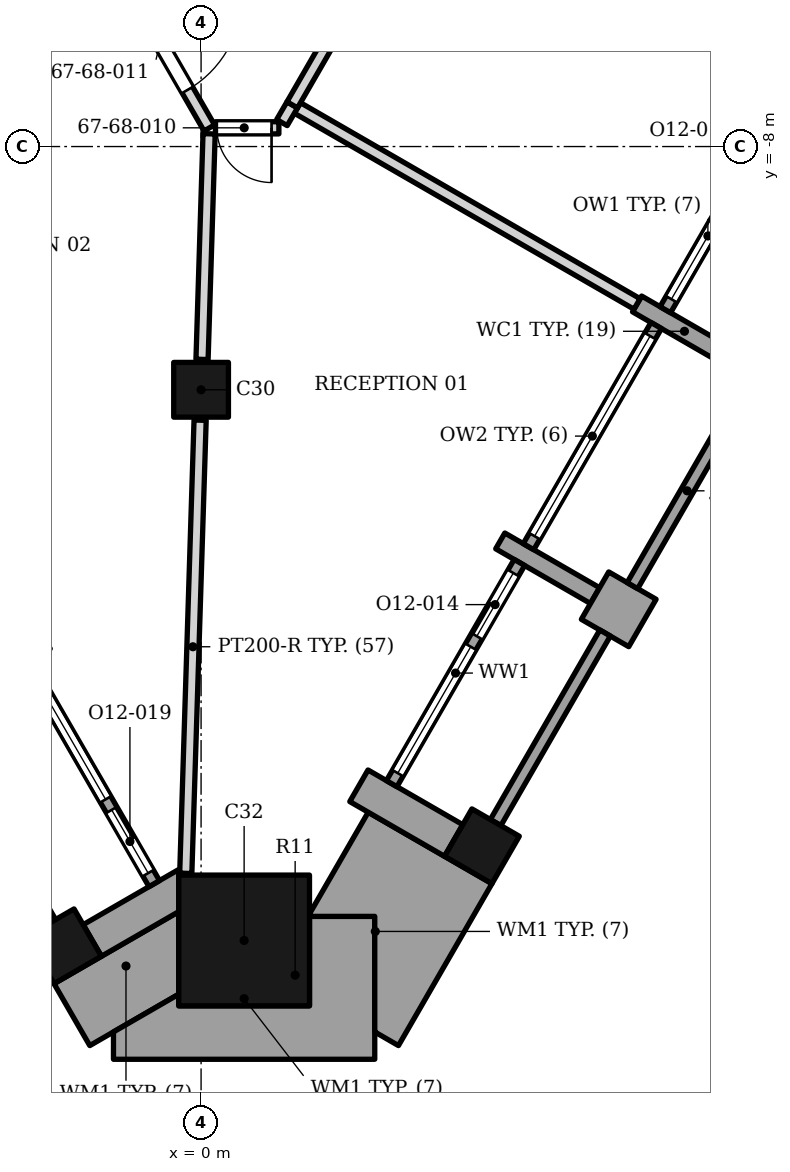
"""IFC4 building model, lengths in metres.
Left out: names, types, materials, properties, quantities, classifications, styles, units other than length and angle.
Written with IfcOpenShell. Run it as: python <this file> out.ifc"""

import sys

from ifc_helpers import new_model, si_unit, direction, frame, frame_2d, origin, origin_2d, place, context, subcontext, project, spatial, polyline, rectangle, outline, extrude, element, fill, save


model = new_model("IFC4")
c1 = context("Model", 3, precision=1e-05, world=origin(), true_north=direction((0.0, 1.0)))
c2 = subcontext(c1, "Body", "Model", "MODEL_VIEW")
j1 = project(units=[si_unit("LENGTHUNIT", "METRE"), si_unit("PLANEANGLEUNIT", "RADIAN")], contexts=[c1])
p1 = place(None, origin())
s1 = spatial("IfcSite", under=j1, at=p1, CompositionType="ELEMENT")
p2 = place(p1, origin())
s2 = spatial("IfcBuilding", under=s1, at=p2, CompositionType="ELEMENT")
p3 = place(p2, frame((0.0, 0.0, 279.4)))
s3 = spatial("IfcBuildingStorey", under=s2, at=p3, CompositionType="ELEMENT", Elevation=279.4)
p4 = place(p3, frame((0.708, -21.056, 0.0), z_axis=(0.0, 0.0, 1.0), x_axis=(0.0, 1.0, 0.0)))
e1 = element("IfcColumn", 1, at=p4, inside=s3, PredefinedType="COLUMN", context=c2, shape_type="SweptSolid", body=[
    extrude(rectangle(XDim=2.15, YDim=2.15, at=origin_2d()), origin(), (0.0, 0.0, 1.0), 3.9),
])
for number, where, z_axis, x_axis in (
    (2, (0.0, -12.0, 0.0), (0.0, 0.0, 1.0), (1.0, 0.0, 0.0)),
    (3, (-2.254, -21.152, 0.0), (0.0, 0.0, 1.0), (0.5, -0.866, 0.0)),
    (4, (4.619, -19.507, 0.0), (0.0, 0.0, 1.0), (0.5, 0.866, 0.0)),
):
    element("IfcColumn", number, at=place(p3, frame(where, z_axis=z_axis, x_axis=x_axis)), inside=s3, PredefinedType="COLUMN", context=c2, shape_type="SweptSolid", body=[
        extrude(rectangle(XDim=0.9, YDim=0.9, at=origin_2d()), origin(), (0.0, 0.0, 1.0), 3.9),
    ])
p5 = place(p3, origin())
e5 = element("IfcWall", 5, at=p5, inside=s3, PredefinedType="SOLIDWALL", context=c2, shape_type="SweptSolid", body=[
    extrude(outline(polyline([(-1.639, -21.316), (-0.367, -20.582), (-0.367, -19.981), (-0.332, -19.981), (-0.381, -19.897), (-1.939, -20.797), (-1.639, -21.316)])), origin(), (0.0, 0.0, 1.0), 3.0),
])
p6 = place(p3, frame((-4.279, -17.644, 0.0), z_axis=(0.0, 0.0, 1.0), x_axis=(0.500012057535, -0.866018442252, 0.0)))
e6 = element("IfcWall", 6, at=p6, inside=s3, PredefinedType="SOLIDWALL", context=c2, shape_type="SweptSolid", body=[
    extrude(rectangle(XDim=3.6, YDim=0.2, at=frame_2d((1.8, 0.0))), origin(), (0.0, 0.0, 1.0), 3.0),
])
p7 = place(p3, frame((-2.87, -16.484, 0.0), z_axis=(0.0, 0.0, 1.0), x_axis=(0.49998411664, -0.866034573852, 0.0)))
e7 = element("IfcWall", 7, at=p7, inside=s3, PredefinedType="ELEMENTEDWALL", context=c2, shape_type="SweptSolid", body=[
    extrude(rectangle(XDim=4.2, YDim=0.2, at=frame_2d((2.1, 0.0))), origin(), (0.0, 0.0, 1.0), 3.0),
])
p8 = place(p7, frame((0.2, 0.0, 0.45)))
e8 = element("IfcOpeningElement", 8, at=p8, cuts=e7, PredefinedType="OPENING", context=c2, shape_type="SweptSolid", body=[
    extrude(rectangle(XDim=2.4, YDim=2.25, at=frame_2d((1.2, 1.125))), frame((0.0, 0.11, 0.0), z_axis=(0.0, -1.0, 0.0), x_axis=(1.0, 0.0, 0.0)), (0.0, 0.0, 1.0), 0.22),
])
p9 = place(p7, frame((2.8, 0.0, 0.0)))
e9 = element("IfcOpeningElement", 9, at=p9, cuts=e7, PredefinedType="OPENING", context=c2, shape_type="SweptSolid", body=[
    extrude(rectangle(XDim=1.2, YDim=2.7, at=frame_2d((0.6, 1.35))), frame((0.0, 0.11, 0.0), z_axis=(0.0, -1.0, 0.0), x_axis=(1.0, 0.0, 0.0)), (0.0, 0.0, 1.0), 0.22),
])
p10 = place(p3, frame((4.154, -19.412, 0.0), z_axis=(0.0, 0.0, 1.0), x_axis=(-0.866047807691, 0.499961193289, 0.0)))
e10 = element("IfcWall", 10, at=p10, inside=s3, PredefinedType="SOLIDWALL", context=c2, shape_type="SweptSolid", body=[
    extrude(rectangle(XDim=1.8, YDim=0.6, at=frame_2d((0.9, 0.0))), origin(), (0.0, 0.0, 1.0), 3.0),
])
p11 = place(p3, frame((6.479, -15.385, 0.0), z_axis=(0.0, 0.0, 1.0), x_axis=(0.866013897511, -0.50001992892, 0.0)))
e11 = element("IfcWall", 11, at=p11, inside=s3, PredefinedType="SOLIDWALL", context=c2, shape_type="SweptSolid", body=[
    extrude(rectangle(XDim=0.9, YDim=0.9, at=frame_2d((0.45, 0.0))), origin(), (0.0, 0.0, 1.0), 3.0),
])
for number, where, z_axis, x_axis in (
    (12, (6.479, -15.385, 0.0), (0.0, 0.0, 1.0), (-0.866, 0.5, 0.0)),
    (13, (8.729, -11.488, 0.0), (0.0, 0.0, 1.0), (-0.866, 0.5, 0.0)),
):
    element("IfcWall", number, at=place(p3, frame(where, z_axis=z_axis, x_axis=x_axis)), inside=s3, PredefinedType="SOLIDWALL", context=c2, shape_type="SweptSolid", body=[
        extrude(rectangle(XDim=1.8, YDim=0.3, at=frame_2d((0.9, 0.0))), origin(), (0.0, 0.0, 1.0), 3.0),
    ])
p12 = place(p3, frame((4.844, -19.118, 0.0), z_axis=(0.0, 0.0, 1.0), x_axis=(0.500012057535, 0.866018442252, 0.0)))
e14 = element("IfcWall", 14, at=p12, inside=s3, PredefinedType="SOLIDWALL", context=c2, shape_type="SweptSolid", body=[
    extrude(rectangle(XDim=3.6, YDim=0.2, at=frame_2d((1.8, 0.0))), origin(), (0.0, 0.0, 1.0), 3.0),
])
p13 = place(p3, frame((3.135, -18.477, 0.0), z_axis=(0.0, 0.0, 1.0), x_axis=(0.500027713859, 0.866009402589, 0.0)))
e15 = element("IfcWall", 15, at=p13, inside=s3, PredefinedType="ELEMENTEDWALL", context=c2, shape_type="SweptSolid", body=[
    extrude(rectangle(XDim=4.2, YDim=0.2, at=frame_2d((2.1, 0.0))), origin(), (0.0, 0.0, 1.0), 3.0),
])
p14 = place(p13, frame((0.2, 0.0, 0.45)))
e16 = element("IfcOpeningElement", 16, at=p14, cuts=e15, PredefinedType="OPENING", context=c2, shape_type="SweptSolid", body=[
    extrude(rectangle(XDim=2.4, YDim=2.25, at=frame_2d((1.2, 1.125))), frame((0.0, 0.11, 0.0), z_axis=(0.0, -1.0, 0.0), x_axis=(1.0, 0.0, 0.0)), (0.0, 0.0, 1.0), 0.22),
])
p15 = place(p13, frame((2.8, 0.0, 0.0)))
e17 = element("IfcOpeningElement", 17, at=p15, cuts=e15, PredefinedType="OPENING", context=c2, shape_type="SweptSolid", body=[
    extrude(rectangle(XDim=1.2, YDim=2.7, at=frame_2d((0.6, 1.35))), frame((0.0, 0.11, 0.0), z_axis=(0.0, -1.0, 0.0), x_axis=(1.0, 0.0, 0.0)), (0.0, 0.0, 1.0), 0.22),
])
p16 = place(p3, frame((7.094, -15.22, 0.0), z_axis=(0.0, 0.0, 1.0), x_axis=(0.500012057535, 0.866018442252, 0.0)))
e18 = element("IfcWall", 18, at=p16, inside=s3, PredefinedType="SOLIDWALL", context=c2, shape_type="SweptSolid", body=[
    extrude(rectangle(XDim=3.6, YDim=0.2, at=frame_2d((1.8, 0.0))), origin(), (0.0, 0.0, 1.0), 3.0),
])
p17 = place(p3, frame((5.385, -14.58, 0.0), z_axis=(0.0, 0.0, 1.0), x_axis=(0.500002543286, 0.866023935413, 0.0)))
e19 = element("IfcWall", 19, at=p17, inside=s3, PredefinedType="ELEMENTEDWALL", context=c2, shape_type="SweptSolid", body=[
    extrude(rectangle(XDim=4.2, YDim=0.2, at=frame_2d((2.1, 0.0))), origin(), (0.0, 0.0, 1.0), 2.95),
])
p18 = place(p17, frame((0.2, 0.0, 0.45)))
e20 = element("IfcOpeningElement", 20, at=p18, cuts=e19, PredefinedType="OPENING", context=c2, shape_type="SweptSolid", body=[
    extrude(rectangle(XDim=3.8, YDim=2.25, at=frame_2d((1.9, 1.125))), frame((0.0, 0.11, 0.0), z_axis=(0.0, -1.0, 0.0), x_axis=(1.0, 0.0, 0.0)), (0.0, 0.0, 1.0), 0.22),
])
p19 = place(p3, frame((7.635, -10.683, 0.0), z_axis=(0.0, 0.0, 1.0), x_axis=(0.500027713859, 0.866009402589, 0.0)))
e21 = element("IfcWall", 21, at=p19, inside=s3, PredefinedType="ELEMENTEDWALL", context=c2, shape_type="SweptSolid", body=[
    extrude(rectangle(XDim=4.2, YDim=0.2, at=frame_2d((2.1, 0.0))), origin(), (0.0, 0.0, 1.0), 3.0),
])
p20 = place(p19, frame((0.2, 0.0, 0.45)))
e22 = element("IfcOpeningElement", 22, at=p20, cuts=e21, PredefinedType="OPENING", context=c2, shape_type="SweptSolid", body=[
    extrude(rectangle(XDim=2.4, YDim=2.25, at=frame_2d((1.2, 1.125))), frame((0.0, 0.11, 0.0), z_axis=(0.0, -1.0, 0.0), x_axis=(1.0, 0.0, 0.0)), (0.0, 0.0, 1.0), 0.22),
])
p21 = place(p19, frame((2.8, 0.0, 0.0)))
e23 = element("IfcOpeningElement", 23, at=p21, cuts=e21, PredefinedType="OPENING", context=c2, shape_type="SweptSolid", body=[
    extrude(rectangle(XDim=1.2, YDim=2.7, at=frame_2d((0.6, 1.35))), frame((0.0, 0.11, 0.0), z_axis=(0.0, -1.0, 0.0), x_axis=(1.0, 0.0, 0.0)), (0.0, 0.0, 1.0), 0.22),
])
p22 = place(p3, origin())
e24 = element("IfcWall", 24, at=p22, inside=s3, PredefinedType="SOLIDWALL", context=c2, shape_type="SweptSolid", body=[
    extrude(outline(polyline([(-0.367, -20.62), (-0.384, -20.591), (-1.639, -21.316), (-1.639, -21.317), (-2.418, -21.767), (-1.831, -22.785), (-0.367, -21.94), (-0.367, -20.62)])), origin(), (0.0, 0.0, 1.0), 3.0),
])
p23 = place(p3, origin())
e25 = element("IfcWall", 25, at=p23, inside=s3, PredefinedType="SOLIDWALL", context=c2, shape_type="SweptSolid", body=[
    extrude(outline(polyline([(-0.367, -22.131), (-0.367, -21.94), (-1.441, -22.56), (-1.441, -23.01), (2.856, -23.01), (2.856, -20.66), (1.783, -20.66), (1.783, -22.131), (-0.367, -22.131)])), origin(), (0.0, 0.0, 1.0), 3.0),
])
p24 = place(p3, origin())
e26 = element("IfcWall", 26, at=p24, inside=s3, PredefinedType="SOLIDWALL", context=c2, shape_type="SweptSolid", body=[
    extrude(outline(polyline([(1.783, -20.619), (1.783, -20.66), (2.856, -20.66), (2.856, -22.56), (3.246, -22.785), (4.784, -20.122), (2.749, -18.947), (1.783, -20.619)])), origin(), (0.0, 0.0, 1.0), 3.0),
])
p25 = place(p3, frame((-0.252, -19.952, 0.0), z_axis=(0.0, 0.0, 1.0), x_axis=(0.031599714418, 0.999500604326, 0.0)))
e27 = element("IfcWall", 27, at=p25, inside=s3, PredefinedType="PARTITIONING", context=c2, shape_type="SweptSolid", body=[
    extrude(rectangle(XDim=7.456, YDim=0.2, at=frame_2d((3.728, 0.0))), origin(), (0.0, 0.0, 1.0), 3.332),
])
p26 = place(p3, frame((0.016, -11.5, 0.0), z_axis=(0.0, 0.0, 1.0), x_axis=(0.031312793596, 0.999509634249, 0.0)))
e28 = element("IfcWall", 28, at=p26, inside=s3, PredefinedType="PARTITIONING", context=c2, shape_type="SweptSolid", body=[
    extrude(rectangle(XDim=3.711, YDim=0.2, at=frame_2d((1.855, 0.0))), origin(), (0.0, 0.0, 1.0), 2.884),
])
p27 = place(p3, frame((1.584, -7.365, 0.0), z_axis=(0.0, 0.0, 1.0), x_axis=(0.866145880339, -0.499791270404, 0.0)))
e29 = element("IfcWall", 29, at=p27, inside=s3, PredefinedType="PARTITIONING", context=c2, shape_type="SweptSolid", body=[
    extrude(rectangle(XDim=6.449, YDim=0.2, at=frame_2d((3.225, 0.0))), origin(), (0.0, 0.0, 1.0), 2.884),
])
p28 = place(p3, frame((-5.885, 2.733, 0.0), z_axis=(0.0, 0.0, 1.0), x_axis=(0.499999199346, -0.866025866042, 0.0)))
e30 = element("IfcWall", 30, at=p28, inside=s3, PredefinedType="PARTITIONING", context=c2, shape_type="SweptSolid", body=[
    extrude(rectangle(XDim=12.04, YDim=0.2, at=frame_2d((6.02, 0.0))), origin(), (0.0, 0.0, 1.0), 2.884),
])
p29 = place(p28, frame((4.0, 0.0, 0.0)))
e31 = element("IfcOpeningElement", 31, at=p29, cuts=e30, PredefinedType="OPENING", context=c2, shape_type="SweptSolid", body=[
    extrude(rectangle(XDim=1.0, YDim=2.4, at=frame_2d((0.5, 1.2))), frame((0.0, 0.11, 0.0), z_axis=(0.0, -1.0, 0.0), x_axis=(1.0, 0.0, 0.0)), (0.0, 0.0, 1.0), 0.22),
])
p30 = place(p28, frame((9.52, 0.0, 0.0)))
e32 = element("IfcOpeningElement", 32, at=p30, cuts=e30, PredefinedType="OPENING", context=c2, shape_type="SweptSolid", body=[
    extrude(rectangle(XDim=1.8, YDim=2.4, at=frame_2d((0.9, 1.2))), frame((0.0, 0.11, 0.0), z_axis=(0.0, -1.0, 0.0), x_axis=(1.0, 0.0, 0.0)), (0.0, 0.0, 1.0), 0.22),
])
p31 = place(p3, frame((0.236, -7.692, 0.0), z_axis=(0.0, 0.0, 1.0), x_axis=(1.0, 0.0, 0.0)))
e33 = element("IfcWall", 33, at=p31, inside=s3, PredefinedType="PARTITIONING", context=c2, shape_type="SweptSolid", body=[
    extrude(rectangle(XDim=1.043, YDim=0.2, at=frame_2d((0.522, 0.0))), origin(), (0.0, 0.0, 1.0), 3.73),
])
p32 = place(p31, frame((0.023, 0.0, 0.0)))
e34 = element("IfcOpeningElement", 34, at=p32, cuts=e33, PredefinedType="OPENING", context=c2, shape_type="SweptSolid", body=[
    extrude(rectangle(XDim=0.9, YDim=2.1, at=frame_2d((0.45, 1.05))), frame((0.0, 0.11, 0.0), z_axis=(0.0, -1.0, 0.0), x_axis=(1.0, 0.0, 0.0)), (0.0, 0.0, 1.0), 0.22),
])
p33 = place(p3, frame((1.33, -7.606, 0.0), z_axis=(0.0, 0.0, 1.0), x_axis=(0.503375579216, 0.86406772087, 0.0)))
e35 = element("IfcWall", 35, at=p33, inside=s3, PredefinedType="PARTITIONING", context=c2, shape_type="SweptSolid", body=[
    extrude(rectangle(XDim=0.337, YDim=0.2, at=frame_2d((0.168, 0.0))), origin(), (0.0, 0.0, 1.0), 3.73),
])
p34 = place(p3, frame((-7.055, -8.336, 0.0), z_axis=(0.0, 0.0, 1.0), x_axis=(0.866129493323, 0.499819668277, 0.0)))
e36 = element("IfcWall", 36, at=p34, inside=s3, PredefinedType="PARTITIONING", context=c2, shape_type="SweptSolid", body=[
    extrude(rectangle(XDim=6.45, YDim=0.2, at=frame_2d((3.225, 0.0))), origin(), (0.0, 0.0, 1.0), 2.884),
])
p35 = place(p3, frame((1.5, -7.314, 0.0), z_axis=(0.0, 0.0, 1.0), x_axis=(0.499990139034, 0.866031096941, 0.0)))
e37 = element("IfcWall", 37, at=p35, inside=s3, PredefinedType="PARTITIONING", context=c2, shape_type="SweptSolid", body=[
    extrude(rectangle(XDim=9.0, YDim=0.2, at=frame_2d((4.5, 0.0))), origin(), (0.0, 0.0, 1.0), 2.884),
])
p36 = place(p35, frame((4.0, 0.0, 0.0)))
e38 = element("IfcOpeningElement", 38, at=p36, cuts=e37, PredefinedType="OPENING", context=c2, shape_type="SweptSolid", body=[
    extrude(rectangle(XDim=1.0, YDim=2.1, at=frame_2d((0.5, 1.05))), frame((0.0, 0.11, 0.0), z_axis=(0.0, -1.0, 0.0), x_axis=(1.0, 0.0, 0.0)), (0.0, 0.0, 1.0), 0.22),
])
p37 = place(p8, origin())
e39 = element("IfcWindow", 39, at=p37, inside=s3, PartitioningType="SINGLE_PANEL", PredefinedType="WINDOW", context=c2, shape_type="SweptSolid", body=[
    extrude(rectangle(XDim=2.4, YDim=2.25, at=frame_2d((1.2, 1.125))), frame((0.0, 0.03, 0.0), z_axis=(0.0, -1.0, 0.0), x_axis=(1.0, 0.0, 0.0)), (0.0, 0.0, 1.0), 0.06),
])
fill(e8, e39)
p38 = place(p9, origin())
e40 = element("IfcDoor", 40, at=p38, inside=s3, OperationType="SINGLE_SWING_LEFT", PredefinedType="DOOR", context=c2, shape_type="SweptSolid", body=[
    extrude(rectangle(XDim=1.2, YDim=2.7, at=frame_2d((0.6, 1.35))), frame((0.0, 0.025, 0.0), z_axis=(0.0, -1.0, 0.0), x_axis=(1.0, 0.0, 0.0)), (0.0, 0.0, 1.0), 0.05),
])
fill(e9, e40)
p39 = place(p14, origin())
e41 = element("IfcWindow", 41, at=p39, inside=s3, PartitioningType="SINGLE_PANEL", PredefinedType="WINDOW", context=c2, shape_type="SweptSolid", body=[
    extrude(rectangle(XDim=2.4, YDim=2.25, at=frame_2d((1.2, 1.125))), frame((0.0, 0.03, 0.0), z_axis=(0.0, -1.0, 0.0), x_axis=(1.0, 0.0, 0.0)), (0.0, 0.0, 1.0), 0.06),
])
fill(e16, e41)
p40 = place(p15, origin())
e42 = element("IfcDoor", 42, at=p40, inside=s3, OperationType="SINGLE_SWING_LEFT", PredefinedType="DOOR", context=c2, shape_type="SweptSolid", body=[
    extrude(rectangle(XDim=1.2, YDim=2.7, at=frame_2d((0.6, 1.35))), frame((0.0, 0.025, 0.0), z_axis=(0.0, -1.0, 0.0), x_axis=(1.0, 0.0, 0.0)), (0.0, 0.0, 1.0), 0.05),
])
fill(e17, e42)
p41 = place(p18, origin())
e43 = element("IfcWindow", 43, at=p41, inside=s3, PartitioningType="SINGLE_PANEL", PredefinedType="WINDOW", context=c2, shape_type="SweptSolid", body=[
    extrude(rectangle(XDim=3.8, YDim=2.25, at=frame_2d((1.9, 1.125))), frame((0.0, 0.03, 0.0), z_axis=(0.0, -1.0, 0.0), x_axis=(1.0, 0.0, 0.0)), (0.0, 0.0, 1.0), 0.06),
])
fill(e20, e43)
p42 = place(p20, origin())
e44 = element("IfcWindow", 44, at=p42, inside=s3, PartitioningType="SINGLE_PANEL", PredefinedType="WINDOW", context=c2, shape_type="SweptSolid", body=[
    extrude(rectangle(XDim=2.4, YDim=2.25, at=frame_2d((1.2, 1.125))), frame((0.0, 0.03, 0.0), z_axis=(0.0, -1.0, 0.0), x_axis=(1.0, 0.0, 0.0)), (0.0, 0.0, 1.0), 0.06),
])
fill(e22, e44)
p43 = place(p32, origin())
e45 = element("IfcDoor", 45, at=p43, inside=s3, OperationType="SINGLE_SWING_RIGHT", PredefinedType="DOOR", context=c2, shape_type="SweptSolid", body=[
    extrude(rectangle(XDim=0.9, YDim=2.1, at=frame_2d((0.45, 1.05))), frame((0.0, 0.025, 0.0), z_axis=(0.0, -1.0, 0.0), x_axis=(1.0, 0.0, 0.0)), (0.0, 0.0, 1.0), 0.05),
])
fill(e34, e45)
p44 = place(p30, origin())
e46 = element("IfcDoor", 46, at=p44, inside=s3, OperationType="DOUBLE_DOOR_SINGLE_SWING", PredefinedType="DOOR", context=c2, shape_type="SweptSolid", body=[
    extrude(rectangle(XDim=1.8, YDim=2.4, at=frame_2d((0.9, 1.2))), frame((0.0, 0.025, 0.0), z_axis=(0.0, -1.0, 0.0), x_axis=(1.0, 0.0, 0.0)), (0.0, 0.0, 1.0), 0.05),
])
fill(e32, e46)
save(model, sys.argv[1])
